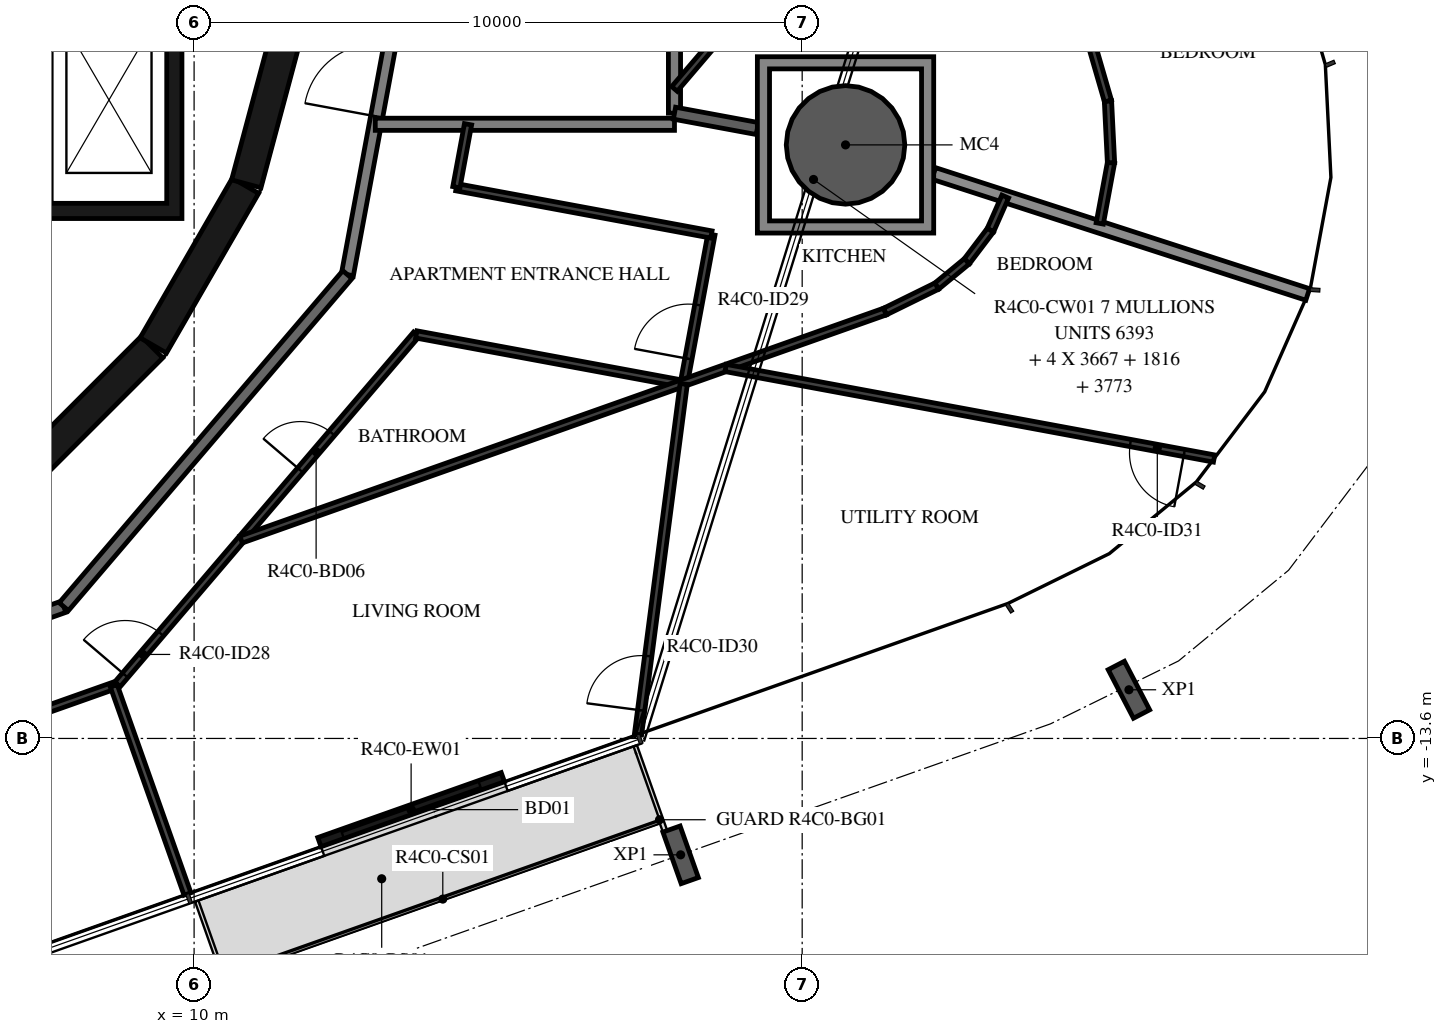
"""IFC4 building model, lengths in metres.
Left out: names, types, materials, properties, quantities, classifications, styles, units other than length and angle.
Written with IfcOpenShell. Run it as: python <this file> out.ifc"""

import sys

from ifc_helpers import new_model, si_unit, direction, frame, frame_2d, origin, origin_2d, place, context, subcontext, project, spatial, polyline, rectangle, hollow_circle, i_section, outline, extrude, element, fill, save


model = new_model("IFC4")
c1 = context("Model", 3, precision=1e-05, world=origin(), true_north=direction((0.0, 1.0)))
c2 = subcontext(c1, "Body", "Model", "MODEL_VIEW")
j1 = project(units=[si_unit("LENGTHUNIT", "METRE"), si_unit("PLANEANGLEUNIT", "RADIAN")], contexts=[c1])
p1 = place(None, origin())
s1 = spatial("IfcSite", under=j1, at=p1, CompositionType="ELEMENT")
p2 = place(p1, origin())
s2 = spatial("IfcBuilding", under=s1, at=p2, CompositionType="ELEMENT")
p3 = place(p2, frame((0.0, 0.0, 172.7)))
s3 = spatial("IfcBuildingStorey", under=s2, at=p3, CompositionType="ELEMENT", Elevation=172.7)
p4 = place(p3, frame((20.713, -3.839, -0.38), z_axis=(0.0, 0.0, 1.0), x_axis=(1.0, 0.0, 0.0)))
e1 = element("IfcColumn", 1, at=p4, inside=s3, PredefinedType="COLUMN", context=c2, shape_type="SweptSolid", body=[
    extrude(hollow_circle(Radius=0.975, WallThickness=0.045, at=origin_2d()), origin(), (0.0, 0.0, 1.0), 3.5),
])
for number, where, z_axis, x_axis in (
    (2, (18.001, -15.514, -0.38), (0.0, 0.0, 1.0), (-0.943, -0.334, 0.0)),
    (3, (25.374, -12.799, -0.38), (0.0, 0.0, 1.0), (-0.887, -0.461, 0.0)),
):
    element("IfcColumn", number, at=place(p3, frame(where, z_axis=z_axis, x_axis=x_axis)), inside=s3, PredefinedType="COLUMN", context=c2, shape_type="SweptSolid", body=[
        extrude(i_section(OverallWidth=0.3, OverallDepth=0.9, WebThickness=0.019, FlangeThickness=0.035, FilletRadius=0.03, at=origin_2d()), origin(), (0.0, 0.0, 1.0), 3.5),
    ])
p5 = place(p3, frame((12.061, -15.305, 0.0), z_axis=(0.0, 0.0, 1.0), x_axis=(0.942620722428, 0.333865502335, 0.0)))
e4 = element("IfcWall", 4, at=p5, inside=s3, PredefinedType="STANDARD", context=c2, shape_type="SweptSolid", body=[
    extrude(rectangle(XDim=3.2, YDim=0.16, at=frame_2d((1.6, 0.0))), origin(), (0.0, 0.0, 1.0), 3.12),
])
p6 = place(p5, frame((0.4, 0.0, 0.0)))
e5 = element("IfcOpeningElement", 5, at=p6, cuts=e4, PredefinedType="OPENING", context=c2, shape_type="SweptSolid", body=[
    extrude(rectangle(XDim=2.4, YDim=2.4, at=frame_2d((1.2, 1.2))), frame((0.0, 0.09, 0.0), z_axis=(0.0, -1.0, 0.0), x_axis=(1.0, 0.0, 0.0)), (0.0, 0.0, 1.0), 0.18),
])
p7 = place(p3, frame((7.164, -9.308, 0.0), z_axis=(0.0, 0.0, 1.0), x_axis=(0.707106781187, 0.707106781187, 0.0)))
e6 = element("IfcWall", 6, at=p7, inside=s3, PredefinedType="SHEAR", context=c2, shape_type="SweptSolid", body=[
    extrude(rectangle(XDim=3.032, YDim=0.5, at=frame_2d((1.516, 0.0))), origin(), (0.0, 0.0, 1.0), 3.12),
])
for number, where, z_axis, x_axis in (
    (7, (9.329, -7.137, 0.0), (0.0, 0.0, 1.0), (0.5, 0.866, 0.0)),
    (8, (10.858, -4.479, 0.0), (0.0, 0.0, 1.0), (0.259, 0.966, 0.0)),
):
    element("IfcWall", number, at=place(p3, frame(where, z_axis=z_axis, x_axis=x_axis)), inside=s3, PredefinedType="SHEAR", context=c2, shape_type="SweptSolid", body=[
        extrude(rectangle(XDim=3.033, YDim=0.5, at=frame_2d((1.516, 0.0))), origin(), (0.0, 0.0, 1.0), 3.12),
    ])
p8 = place(p3, origin())
e9 = element("IfcWall", 9, at=p8, inside=s3, PredefinedType="SHEAR", context=c2, shape_type="SweptSolid", body=[
    extrude(outline(polyline([(9.8, -5.05), (9.8, -4.8), (9.8, -1.9), (9.55, -1.9), (9.55, -4.8), (7.65, -4.8), (7.65, -1.9), (7.4, -1.9), (7.4, -4.8), (5.5, -4.8), (5.5, -1.9), (5.25, -1.9), (5.25, -4.8), (3.35, -4.8), (3.35, -1.9), (3.1, -1.9), (3.1, -4.8), (1.2, -4.8), (1.2, -1.9), (0.95, -1.9), (0.95, -4.8), (-5.25, -4.8), (-5.25, -1.9), (-5.5, -1.9), (-5.5, -4.8), (-7.4, -4.8), (-7.4, -1.9), (-7.65, -1.9), (-7.65, -4.8), (-9.55, -4.8), (-9.55, -1.9), (-9.8, -1.9), (-9.8, -4.8), (-9.8, -5.05), (9.8, -5.05)])), origin(), (0.0, 0.0, 1.0), 3.12),
])
p9 = place(p3, frame((12.521, -5.972, 0.0), z_axis=(0.0, 0.0, 1.0), x_axis=(0.182244189886, 0.983253301674, 0.0)))
e10 = element("IfcWall", 10, at=p9, inside=s3, PredefinedType="STANDARD", context=c2, shape_type="SweptSolid", body=[
    extrude(rectangle(XDim=4.176, YDim=0.2, at=frame_2d((2.088, 0.0))), origin(), (0.0, 0.0, 1.0), 3.12),
])
p10 = place(p9, frame((2.645, 0.0, 0.0)))
e11 = element("IfcOpeningElement", 11, at=p10, cuts=e10, PredefinedType="OPENING", context=c2, shape_type="SweptSolid", body=[
    extrude(rectangle(XDim=1.2, YDim=2.1, at=frame_2d((0.6, 1.05))), frame((0.0, 0.11, 0.0), z_axis=(0.0, -1.0, 0.0), x_axis=(1.0, 0.0, 0.0)), (0.0, 0.0, 1.0), 0.22),
])
p11 = place(p3, frame((1.088, -13.83, 0.0), z_axis=(0.0, 0.0, 1.0), x_axis=(0.942648397945, 0.333787354241, 0.0)))
e12 = element("IfcWall", 12, at=p11, inside=s3, PredefinedType="STANDARD", context=c2, shape_type="SweptSolid", body=[
    extrude(rectangle(XDim=7.181, YDim=0.2, at=frame_2d((3.591, 0.0))), origin(), (0.0, 0.0, 1.0), 3.12),
])
p12 = place(p11, frame((0.2, 0.0, 0.0)))
e13 = element("IfcOpeningElement", 13, at=p12, cuts=e12, PredefinedType="OPENING", context=c2, shape_type="SweptSolid", body=[
    extrude(rectangle(XDim=1.0, YDim=2.1, at=frame_2d((0.5, 1.05))), frame((0.0, 0.11, 0.0), z_axis=(0.0, -1.0, 0.0), x_axis=(1.0, 0.0, 0.0)), (0.0, 0.0, 1.0), 0.22),
])
p13 = place(p3, frame((7.858, -11.433, 0.0), z_axis=(0.0, 0.0, 1.0), x_axis=(0.649440801937, 0.760412154545, 0.0)))
e14 = element("IfcWall", 14, at=p13, inside=s3, PredefinedType="STANDARD", context=c2, shape_type="SweptSolid", body=[
    extrude(rectangle(XDim=7.181, YDim=0.2, at=frame_2d((3.59, 0.0))), origin(), (0.0, 0.0, 1.0), 3.12),
])
p14 = place(p3, frame((17.9, -3.318, 0.0), z_axis=(0.0, 0.0, 1.0), x_axis=(0.0, 1.0, 0.0)))
e15 = element("IfcWall", 15, at=p14, inside=s3, PredefinedType="STANDARD", context=c2, shape_type="SweptSolid", body=[
    extrude(rectangle(XDim=6.818, YDim=0.2, at=frame_2d((3.409, 0.0))), origin(), (0.0, 0.0, 1.0), 3.12),
])
p15 = place(p3, frame((12.979, -3.5, 0.0), z_axis=(0.0, 0.0, 1.0), x_axis=(1.0, 0.0, 0.0)))
e16 = element("IfcWall", 16, at=p15, inside=s3, PredefinedType="STANDARD", context=c2, shape_type="SweptSolid", body=[
    extrude(rectangle(XDim=4.92, YDim=0.2, at=frame_2d((2.46, 0.0))), origin(), (0.0, 0.0, 1.0), 3.12),
])
p16 = place(p3, frame((22.163, -4.308, 0.0), z_axis=(0.0, 0.0, 1.0), x_axis=(0.951422718769, -0.307887658426, 0.0)))
e17 = element("IfcWall", 17, at=p16, inside=s3, PredefinedType="STANDARD", context=c2, shape_type="SweptSolid", body=[
    extrude(rectangle(XDim=6.464, YDim=0.2, at=frame_2d((3.232, 0.0))), origin(), (0.0, 0.0, 1.0), 2.73),
])
p17 = place(p3, frame((17.9, -3.318, 0.0), z_axis=(0.0, 0.0, 1.0), x_axis=(0.983252800712, -0.182246892682, 0.0)))
e18 = element("IfcWall", 18, at=p17, inside=s3, PredefinedType="STANDARD", context=c2, shape_type="SweptSolid", body=[
    extrude(rectangle(XDim=1.386, YDim=0.2, at=frame_2d((0.693, 0.0))), origin(), (0.0, 0.0, 1.0), 3.12),
])
p18 = place(p3, frame((17.9, -2.918, 0.0), z_axis=(0.0, 0.0, 1.0), x_axis=(0.649469887983, 0.760387312232, 0.0)))
e19 = element("IfcWall", 19, at=p18, inside=s3, PredefinedType="PARTITIONING", context=c2, shape_type="SweptSolid", body=[
    extrude(rectangle(XDim=5.527, YDim=0.12, at=frame_2d((2.763, 0.0))), origin(), (0.0, 0.0, 1.0), 3.12),
])
p19 = place(p18, frame((1.7, 0.0, 0.0)))
e20 = element("IfcOpeningElement", 20, at=p19, cuts=e19, PredefinedType="OPENING", context=c2, shape_type="SweptSolid", body=[
    extrude(rectangle(XDim=0.9, YDim=2.1, at=frame_2d((0.45, 1.05))), frame((0.0, 0.07, 0.0), z_axis=(0.0, -1.0, 0.0), x_axis=(1.0, 0.0, 0.0)), (0.0, 0.0, 1.0), 0.14),
])
for number, where, z_axis, x_axis in (
    (21, (24.894, -5.131, 0.0), (0.0, 0.0, 1.0), (0.182, 0.983, 0.0)),
    (22, (25.079, -4.132, 0.0), (0.0, 0.0, 1.0), (-0.049, 0.999, 0.0)),
):
    element("IfcWall", number, at=place(p3, frame(where, z_axis=z_axis, x_axis=x_axis)), inside=s3, PredefinedType="PARTITIONING", context=c2, shape_type="SweptSolid", body=[
        extrude(rectangle(XDim=1.016, YDim=0.12, at=frame_2d((0.508, 0.0))), origin(), (0.0, 0.0, 1.0), 3.12),
    ])
p20 = place(p3, frame((25.029, -3.117, 0.0), z_axis=(0.0, 0.0, 1.0), x_axis=(-0.278559922069, 0.96041885124, 0.0)))
e23 = element("IfcWall", 23, at=p20, inside=s3, PredefinedType="PARTITIONING", context=c2, shape_type="SweptSolid", body=[
    extrude(rectangle(XDim=1.016, YDim=0.12, at=frame_2d((0.508, 0.0))), origin(), (0.0, 0.0, 1.0), 3.12),
])
p21 = place(p3, frame((1.269, -15.357, 0.0), z_axis=(0.0, 0.0, 1.0), x_axis=(0.942639442898, 0.333812643101, 0.0)))
e24 = element("IfcWall", 24, at=p21, inside=s3, PredefinedType="PARTITIONING", context=c2, shape_type="SweptSolid", body=[
    extrude(rectangle(XDim=7.86, YDim=0.12, at=frame_2d((3.93, 0.0))), origin(), (0.0, 0.0, 1.0), 3.12),
])
p22 = place(p21, frame((0.2, 0.0, 0.0)))
e25 = element("IfcOpeningElement", 25, at=p22, cuts=e24, PredefinedType="OPENING", context=c2, shape_type="SweptSolid", body=[
    extrude(rectangle(XDim=0.9, YDim=2.1, at=frame_2d((0.45, 1.05))), frame((0.0, 0.07, 0.0), z_axis=(0.0, -1.0, 0.0), x_axis=(1.0, 0.0, 0.0)), (0.0, 0.0, 1.0), 0.14),
])
p23 = place(p3, frame((8.737, -12.713, 0.0), z_axis=(0.0, 0.0, 1.0), x_axis=(0.649427973074, 0.760423111031, 0.0)))
e26 = element("IfcWall", 26, at=p23, inside=s3, PredefinedType="PARTITIONING", context=c2, shape_type="SweptSolid", body=[
    extrude(rectangle(XDim=7.571, YDim=0.12, at=frame_2d((3.785, 0.0))), origin(), (0.0, 0.0, 1.0), 3.12),
])
p24 = place(p23, frame((0.2, 0.0, 0.0)))
e27 = element("IfcOpeningElement", 27, at=p24, cuts=e26, PredefinedType="OPENING", context=c2, shape_type="SweptSolid", body=[
    extrude(rectangle(XDim=0.9, YDim=2.1, at=frame_2d((0.45, 1.05))), frame((0.0, 0.07, 0.0), z_axis=(0.0, -1.0, 0.0), x_axis=(1.0, 0.0, 0.0)), (0.0, 0.0, 1.0), 0.14),
])
p25 = place(p23, frame((4.634, 0.0, 0.0)))
e28 = element("IfcOpeningElement", 28, at=p25, cuts=e26, PredefinedType="OPENING", context=c2, shape_type="SweptSolid", body=[
    extrude(rectangle(XDim=0.8, YDim=2.1, at=frame_2d((0.4, 1.05))), frame((0.0, 0.07, 0.0), z_axis=(0.0, -1.0, 0.0), x_axis=(1.0, 0.0, 0.0)), (0.0, 0.0, 1.0), 0.14),
])
p26 = place(p3, frame((13.654, -6.956, 0.0), z_axis=(0.0, 0.0, 1.0), x_axis=(0.983253166233, -0.18224492062, 0.0)))
e29 = element("IfcWall", 29, at=p26, inside=s3, PredefinedType="PARTITIONING", context=c2, shape_type="SweptSolid", body=[
    extrude(rectangle(XDim=4.437, YDim=0.12, at=frame_2d((2.218, 0.0))), origin(), (0.0, 0.0, 1.0), 3.12),
])
p27 = place(p3, frame((18.055, -7.75, 0.0), z_axis=(0.0, 0.0, 1.0), x_axis=(0.18225497314, 0.983251302957, 0.0)))
e30 = element("IfcWall", 30, at=p27, inside=s3, PredefinedType="PARTITIONING", context=c2, shape_type="SweptSolid", body=[
    extrude(rectangle(XDim=2.479, YDim=0.12, at=frame_2d((1.24, 0.0))), origin(), (0.0, 0.0, 1.0), 3.12),
])
p28 = place(p27, frame((0.4, 0.0, 0.0)))
e31 = element("IfcOpeningElement", 31, at=p28, cuts=e30, PredefinedType="OPENING", context=c2, shape_type="SweptSolid", body=[
    extrude(rectangle(XDim=0.9, YDim=2.1, at=frame_2d((0.45, 1.05))), frame((0.0, 0.07, 0.0), z_axis=(0.0, -1.0, 0.0), x_axis=(1.0, 0.0, 0.0)), (0.0, 0.0, 1.0), 0.14),
])
p29 = place(p3, frame((18.507, -5.312, 0.0), z_axis=(0.0, 0.0, 1.0), x_axis=(-0.983254286603, 0.182238875868, 0.0)))
e32 = element("IfcWall", 32, at=p29, inside=s3, PredefinedType="PARTITIONING", context=c2, shape_type="SweptSolid", body=[
    extrude(rectangle(XDim=4.266, YDim=0.12, at=frame_2d((2.133, 0.0))), origin(), (0.0, 0.0, 1.0), 3.12),
])
p30 = place(p3, frame((14.313, -4.535, 0.0), z_axis=(0.0, 0.0, 1.0), x_axis=(0.182271946033, 0.983248156718, 0.0)))
e33 = element("IfcWall", 33, at=p30, inside=s3, PredefinedType="PARTITIONING", context=c2, shape_type="SweptSolid", body=[
    extrude(rectangle(XDim=1.053, YDim=0.12, at=frame_2d((0.526, 0.0))), origin(), (0.0, 0.0, 1.0), 3.12),
])
p31 = place(p3, frame((9.891, -16.158, 0.0), z_axis=(0.0, 0.0, 1.0), x_axis=(-0.33385336213, 0.942625022262, 0.0)))
e34 = element("IfcWall", 34, at=p31, inside=s3, PredefinedType="PARTITIONING", context=c2, shape_type="SweptSolid", body=[
    extrude(rectangle(XDim=3.633, YDim=0.12, at=frame_2d((1.816, 0.0))), origin(), (0.0, 0.0, 1.0), 2.73),
])
p32 = place(p3, frame((21.362, -6.58, 0.0), z_axis=(0.0, 0.0, 1.0), x_axis=(-0.942647598157, -0.333789612913, 0.0)))
e35 = element("IfcWall", 35, at=p32, inside=s3, PredefinedType="PARTITIONING", context=c2, shape_type="SweptSolid", body=[
    extrude(rectangle(XDim=11.234, YDim=0.12, at=frame_2d((5.617, 0.0))), origin(), (0.0, 0.0, 1.0), 3.12),
])
p33 = place(p3, frame((17.3, -13.534, 0.0), z_axis=(0.0, 0.0, 1.0), x_axis=(0.129290698847, 0.99160673414, 0.0)))
e36 = element("IfcWall", 36, at=p33, inside=s3, PredefinedType="PARTITIONING", context=c2, shape_type="SweptSolid", body=[
    extrude(rectangle(XDim=5.812, YDim=0.12, at=frame_2d((2.906, 0.0))), origin(), (0.0, 0.0, 1.0), 3.12),
])
p34 = place(p33, frame((0.4, 0.0, 0.0)))
e37 = element("IfcOpeningElement", 37, at=p34, cuts=e36, PredefinedType="OPENING", context=c2, shape_type="SweptSolid", body=[
    extrude(rectangle(XDim=0.9, YDim=2.1, at=frame_2d((0.45, 1.05))), frame((0.0, 0.07, 0.0), z_axis=(0.0, -1.0, 0.0), x_axis=(1.0, 0.0, 0.0)), (0.0, 0.0, 1.0), 0.14),
])
p35 = place(p3, frame((26.774, -8.997, 0.0), z_axis=(0.0, 0.0, 1.0), x_axis=(-0.983258019748, 0.18221873285, 0.0)))
e38 = element("IfcWall", 38, at=p35, inside=s3, PredefinedType="PARTITIONING", context=c2, shape_type="SweptSolid", body=[
    extrude(rectangle(XDim=8.17, YDim=0.12, at=frame_2d((4.085, 0.0))), origin(), (0.0, 0.0, 1.0), 3.12),
])
p36 = place(p35, frame((0.5, 0.0, 0.0)))
e39 = element("IfcOpeningElement", 39, at=p36, cuts=e38, PredefinedType="OPENING", context=c2, shape_type="SweptSolid", body=[
    extrude(rectangle(XDim=0.9, YDim=2.1, at=frame_2d((0.45, 1.05))), frame((0.0, 0.07, 0.0), z_axis=(0.0, -1.0, 0.0), x_axis=(1.0, 0.0, 0.0)), (0.0, 0.0, 1.0), 0.14),
])
p37 = place(p3, frame((23.34, -4.689, 0.0), z_axis=(0.0, 0.0, 1.0), x_axis=(-0.404077449371, -0.914724775498, 0.0)))
e40 = element("IfcWall", 40, at=p37, inside=s3, PredefinedType="PARTITIONING", context=c2, shape_type="SweptSolid", body=[
    extrude(rectangle(XDim=0.605, YDim=0.12, at=frame_2d((0.302, 0.0))), origin(), (0.0, 0.0, 1.0), 3.12),
])
for number, where, z_axis, x_axis in (
    (41, (23.095, -5.242, 0.0), (0.0, 0.0, 1.0), (-0.604, -0.797, 0.0)),
    (42, (22.708, -5.754, 0.0), (0.0, 0.0, 1.0), (-0.772, -0.636, 0.0)),
):
    element("IfcWall", number, at=place(p3, frame(where, z_axis=z_axis, x_axis=x_axis)), inside=s3, PredefinedType="PARTITIONING", context=c2, shape_type="SweptSolid", body=[
        extrude(rectangle(XDim=0.642, YDim=0.12, at=frame_2d((0.321, 0.0))), origin(), (0.0, 0.0, 1.0), 3.12),
    ])
p38 = place(p3, frame((22.212, -6.162, 0.0), z_axis=(0.0, 0.0, 1.0), x_axis=(-0.897448694974, -0.441118850072, 0.0)))
e43 = element("IfcWall", 43, at=p38, inside=s3, PredefinedType="PARTITIONING", context=c2, shape_type="SweptSolid", body=[
    extrude(rectangle(XDim=0.947, YDim=0.12, at=frame_2d((0.474, 0.0))), origin(), (0.0, 0.0, 1.0), 3.12),
])
p39 = place(p3, origin())
e44 = element("IfcWall", 44, at=p39, inside=s3, PredefinedType="STANDARD", context=c2, shape_type="SweptSolid", body=[
    extrude(outline(polyline([(22.163, -2.389), (22.163, -5.289), (19.263, -5.289), (19.263, -2.389), (22.163, -2.389)]), holes=[polyline([(19.463, -5.089), (21.963, -5.089), (21.963, -2.589), (19.463, -2.589), (19.463, -5.089)])]), origin(), (0.0, 0.0, 1.0), 3.12),
])
p40 = place(p6, origin())
e45 = element("IfcDoor", 45, at=p40, inside=s3, OperationType="DOUBLE_DOOR_SLIDING", PredefinedType="DOOR", context=c2, shape_type="SweptSolid", body=[
    extrude(rectangle(XDim=2.4, YDim=2.4, at=frame_2d((1.2, 1.2))), frame((0.0, 0.025, 0.0), z_axis=(0.0, -1.0, 0.0), x_axis=(1.0, 0.0, 0.0)), (0.0, 0.0, 1.0), 0.05),
])
fill(e5, e45)
p41 = place(p24, origin())
e46 = element("IfcDoor", 46, at=p41, inside=s3, OperationType="SINGLE_SWING_RIGHT", PredefinedType="DOOR", context=c2, shape_type="SweptSolid", body=[
    extrude(rectangle(XDim=0.9, YDim=2.1, at=frame_2d((0.45, 1.05))), frame((0.0, 0.025, 0.0), z_axis=(0.0, -1.0, 0.0), x_axis=(1.0, 0.0, 0.0)), (0.0, 0.0, 1.0), 0.05),
])
fill(e27, e46)
p42 = place(p25, origin())
e47 = element("IfcDoor", 47, at=p42, inside=s3, OperationType="SINGLE_SWING_RIGHT", PredefinedType="DOOR", context=c2, shape_type="SweptSolid", body=[
    extrude(rectangle(XDim=0.8, YDim=2.1, at=frame_2d((0.4, 1.05))), frame((0.0, 0.025, 0.0), z_axis=(0.0, -1.0, 0.0), x_axis=(1.0, 0.0, 0.0)), (0.0, 0.0, 1.0), 0.05),
])
fill(e28, e47)
p43 = place(p28, origin())
e48 = element("IfcDoor", 48, at=p43, inside=s3, OperationType="SINGLE_SWING_RIGHT", PredefinedType="DOOR", context=c2, shape_type="SweptSolid", body=[
    extrude(rectangle(XDim=0.9, YDim=2.1, at=frame_2d((0.45, 1.05))), frame((0.0, 0.025, 0.0), z_axis=(0.0, -1.0, 0.0), x_axis=(1.0, 0.0, 0.0)), (0.0, 0.0, 1.0), 0.05),
])
fill(e31, e48)
p44 = place(p34, origin())
e49 = element("IfcDoor", 49, at=p44, inside=s3, OperationType="SINGLE_SWING_RIGHT", PredefinedType="DOOR", context=c2, shape_type="SweptSolid", body=[
    extrude(rectangle(XDim=0.9, YDim=2.1, at=frame_2d((0.45, 1.05))), frame((0.0, 0.025, 0.0), z_axis=(0.0, -1.0, 0.0), x_axis=(1.0, 0.0, 0.0)), (0.0, 0.0, 1.0), 0.05),
])
fill(e37, e49)
p45 = place(p36, origin())
e50 = element("IfcDoor", 50, at=p45, inside=s3, OperationType="SINGLE_SWING_RIGHT", PredefinedType="DOOR", context=c2, shape_type="SweptSolid", body=[
    extrude(rectangle(XDim=0.9, YDim=2.1, at=frame_2d((0.45, 1.05))), frame((0.0, 0.025, 0.0), z_axis=(0.0, -1.0, 0.0), x_axis=(1.0, 0.0, 0.0)), (0.0, 0.0, 1.0), 0.05),
])
fill(e39, e50)
p46 = place(p10, origin())
e51 = element("IfcDoor", 51, at=p46, inside=s3, OperationType="DOUBLE_DOOR_SINGLE_SWING", PredefinedType="DOOR", context=c2, shape_type="SweptSolid", body=[
    extrude(rectangle(XDim=1.2, YDim=2.1, at=frame_2d((0.6, 1.05))), frame((0.0, 0.025, 0.0), z_axis=(0.0, -1.0, 0.0), x_axis=(1.0, 0.0, 0.0)), (0.0, 0.0, 1.0), 0.05),
])
fill(e11, e51)
save(model, sys.argv[1])
